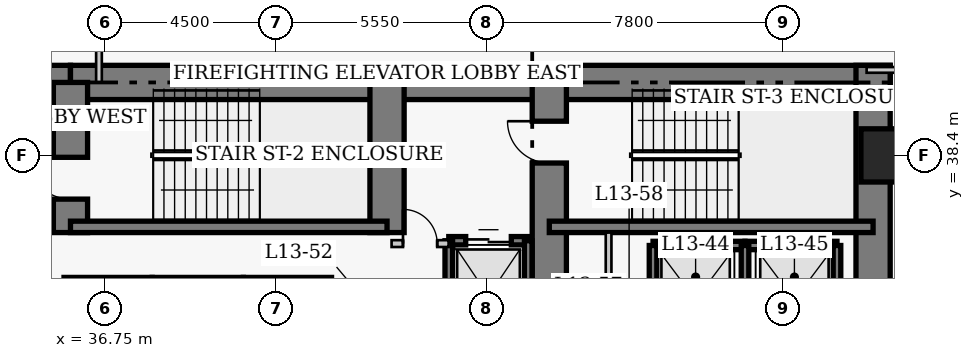
"""IFC4 building model, lengths in metres.
Left out: names, types, materials, properties, quantities, classifications, styles, units other than length and angle.
Written with IfcOpenShell. Run it as: python <this file> out.ifc"""

import sys

from ifc_helpers import new_model, si_unit, direction, frame, frame_2d, origin, origin_2d, place, context, subcontext, project, spatial, rectangle, extrude, element, fill, save


model = new_model("IFC4")
c1 = context("Model", 3, precision=1e-05, world=origin(), true_north=direction((0.0, 1.0)))
c2 = subcontext(c1, "Body", "Model", "MODEL_VIEW")
j1 = project(units=[si_unit("LENGTHUNIT", "METRE"), si_unit("PLANEANGLEUNIT", "RADIAN")], contexts=[c1])
p1 = place(None, origin())
s1 = spatial("IfcSite", under=j1, at=p1, CompositionType="ELEMENT")
p2 = place(p1, origin())
s2 = spatial("IfcBuilding", under=s1, at=p2, CompositionType="ELEMENT")
p3 = place(p2, frame((0.0, 0.0, 56.4)))
s3 = spatial("IfcBuildingStorey", under=s2, at=p3, CompositionType="ELEMENT", Elevation=56.4)
p4 = place(p3, frame((21.45, 40.32, 0.0), z_axis=(0.0, 0.0, 1.0), x_axis=(1.0, 0.0, 0.0)))
e1 = element("IfcWall", 1, at=p4, inside=s3, PredefinedType="SHEAR", context=c2, shape_type="SweptSolid", body=[
    extrude(rectangle(XDim=14.4, YDim=0.9, at=frame_2d((7.2, 0.0))), origin(), (0.0, 0.0, 1.0), 3.8),
])
p5 = place(p3, frame((35.85, 40.32, 0.0), z_axis=(0.0, 0.0, 1.0), x_axis=(1.0, 0.0, 0.0)))
e2 = element("IfcWall", 2, at=p5, inside=s3, PredefinedType="SHEAR", context=c2, shape_type="SweptSolid", body=[
    extrude(rectangle(XDim=12.6, YDim=0.9, at=frame_2d((6.3, 0.0))), origin(), (0.0, 0.0, 1.0), 3.8),
])
p6 = place(p3, frame((48.45, 40.32, 0.0), z_axis=(0.0, 0.0, 1.0), x_axis=(1.0, 0.0, 0.0)))
e3 = element("IfcWall", 3, at=p6, inside=s3, PredefinedType="SHEAR", context=c2, shape_type="SweptSolid", body=[
    extrude(rectangle(XDim=8.97, YDim=0.9, at=frame_2d((4.485, 0.0))), origin(), (0.0, 0.0, 1.0), 3.8),
])
p7 = place(p3, frame((56.97, 27.05, 0.0), z_axis=(0.0, 0.0, 1.0), x_axis=(0.0, 1.0, 0.0)))
e4 = element("IfcWall", 4, at=p7, inside=s3, PredefinedType="SHEAR", context=c2, shape_type="SweptSolid", body=[
    extrude(rectangle(XDim=13.72, YDim=0.9, at=frame_2d((6.86, 0.0))), origin(), (0.0, 0.0, 1.0), 3.8),
])
p8 = place(p3, frame((35.85, 36.37, 0.0), z_axis=(0.0, 0.0, 1.0), x_axis=(0.0, 1.0, 0.0)))
e5 = element("IfcWall", 5, at=p8, inside=s3, PredefinedType="SHEAR", context=c2, shape_type="SweptSolid", body=[
    extrude(rectangle(XDim=3.95, YDim=0.9, at=frame_2d((1.975, 0.0))), origin(), (0.0, 0.0, 1.0), 3.8),
])
p9 = place(p8, frame((0.88, 0.0, 0.0)))
e6 = element("IfcOpeningElement", 6, at=p9, cuts=e5, PredefinedType="OPENING", context=c2, shape_type="SweptSolid", body=[
    extrude(rectangle(XDim=1.1, YDim=2.15, at=frame_2d((0.55, 1.075))), frame((0.0, 0.46, 0.0), z_axis=(0.0, -1.0, 0.0), x_axis=(1.0, 0.0, 0.0)), (0.0, 0.0, 1.0), 0.92),
])
p10 = place(p3, frame((44.18, 36.37, 0.0), z_axis=(0.0, 0.0, 1.0), x_axis=(0.0, 1.0, 0.0)))
e7 = element("IfcWall", 7, at=p10, inside=s3, PredefinedType="SHEAR", context=c2, shape_type="SweptSolid", body=[
    extrude(rectangle(XDim=3.95, YDim=0.9, at=frame_2d((1.975, 0.0))), origin(), (0.0, 0.0, 1.0), 3.8),
])
p11 = place(p3, frame((48.45, 32.3, 0.0), z_axis=(0.0, 0.0, 1.0), x_axis=(0.0, 1.0, 0.0)))
e8 = element("IfcWall", 8, at=p11, inside=s3, PredefinedType="SHEAR", context=c2, shape_type="SweptSolid", body=[
    extrude(rectangle(XDim=8.02, YDim=0.9, at=frame_2d((4.01, 0.0))), origin(), (0.0, 0.0, 1.0), 3.8),
])
p12 = place(p11, frame((5.9, 0.0, 0.0)))
e9 = element("IfcOpeningElement", 9, at=p12, cuts=e8, PredefinedType="OPENING", context=c2, shape_type="SweptSolid", body=[
    extrude(rectangle(XDim=1.1, YDim=2.15, at=frame_2d((0.55, 1.075))), frame((0.0, 0.46, 0.0), z_axis=(0.0, -1.0, 0.0), x_axis=(1.0, 0.0, 0.0)), (0.0, 0.0, 1.0), 0.92),
])
p13 = place(p3, frame((35.85, 36.52, 0.0), z_axis=(0.0, 0.0, 1.0), x_axis=(1.0, 0.0, 0.0)))
e10 = element("IfcWall", 10, at=p13, inside=s3, PredefinedType="SHEAR", context=c2, shape_type="SweptSolid", body=[
    extrude(rectangle(XDim=8.33, YDim=0.3, at=frame_2d((4.165, 0.0))), origin(), (0.0, 0.0, 1.0), 3.8),
])
p14 = place(p3, frame((48.45, 36.52, 0.0), z_axis=(0.0, 0.0, 1.0), x_axis=(1.0, 0.0, 0.0)))
e11 = element("IfcWall", 11, at=p14, inside=s3, PredefinedType="SHEAR", context=c2, shape_type="SweptSolid", body=[
    extrude(rectangle(XDim=8.52, YDim=0.3, at=frame_2d((4.26, 0.0))), origin(), (0.0, 0.0, 1.0), 3.8),
])
p15 = place(p3, frame((57.35, 38.4, 0.0), z_axis=(0.0, 0.0, 1.0), x_axis=(1.0, 0.0, 0.0)))
e12 = element("IfcColumn", 12, at=p15, inside=s3, PredefinedType="COLUMN", context=c2, shape_type="SweptSolid", body=[
    extrude(rectangle(XDim=1.4, YDim=1.4, at=origin_2d()), origin(), (0.0, 0.0, 1.0), 3.8),
])
p16 = place(p3, frame((35.68, 35.08, 0.0), z_axis=(0.0, 0.0, 1.0), x_axis=(1.0, 0.0, 0.0)))
e13 = element("IfcWall", 13, at=p16, inside=s3, PredefinedType="SHEAR", context=c2, shape_type="SweptSolid", body=[
    extrude(rectangle(XDim=2.32, YDim=0.22, at=frame_2d((1.16, 0.0))), origin(), (0.0, 0.0, 1.0), 3.8),
])
p17 = place(p3, frame((38.0, 35.08, 0.0), z_axis=(0.0, 0.0, 1.0), x_axis=(1.0, 0.0, 0.0)))
e14 = element("IfcWall", 14, at=p17, inside=s3, PredefinedType="SHEAR", context=c2, shape_type="SweptSolid", body=[
    extrude(rectangle(XDim=2.4, YDim=0.22, at=frame_2d((1.2, 0.0))), origin(), (0.0, 0.0, 1.0), 3.8),
])
p18 = place(p3, frame((40.4, 35.08, 0.0), z_axis=(0.0, 0.0, 1.0), x_axis=(1.0, 0.0, 0.0)))
e15 = element("IfcWall", 15, at=p18, inside=s3, PredefinedType="SHEAR", context=c2, shape_type="SweptSolid", body=[
    extrude(rectangle(XDim=2.32, YDim=0.22, at=frame_2d((1.16, 0.0))), origin(), (0.0, 0.0, 1.0), 3.8),
])
p19 = place(p3, frame((51.18, 36.03, 0.0), z_axis=(0.0, 0.0, 1.0), x_axis=(1.0, 0.0, 0.0)))
e16 = element("IfcWall", 16, at=p19, inside=s3, PredefinedType="SHEAR", context=c2, shape_type="SweptSolid", body=[
    extrude(rectangle(XDim=2.42, YDim=0.22, at=frame_2d((1.21, 0.0))), origin(), (0.0, 0.0, 1.0), 3.8),
])
p20 = place(p3, frame((51.18, 33.17, 0.0), z_axis=(0.0, 0.0, 1.0), x_axis=(0.0, 1.0, 0.0)))
e17 = element("IfcWall", 17, at=p20, inside=s3, PredefinedType="SHEAR", context=c2, shape_type="SweptSolid", body=[
    extrude(rectangle(XDim=2.86, YDim=0.2, at=frame_2d((1.43, 0.0))), origin(), (0.0, 0.0, 1.0), 3.8),
])
p21 = place(p3, frame((53.6, 36.03, 0.0), z_axis=(0.0, 0.0, 1.0), x_axis=(1.0, 0.0, 0.0)))
e18 = element("IfcWall", 18, at=p21, inside=s3, PredefinedType="SHEAR", context=c2, shape_type="SweptSolid", body=[
    extrude(rectangle(XDim=2.42, YDim=0.22, at=frame_2d((1.21, 0.0))), origin(), (0.0, 0.0, 1.0), 3.8),
])
for number, where, z_axis, x_axis in (
    (19, (53.6, 33.17, 0.0), (0.0, 0.0, 1.0), (0.0, 1.0, 0.0)),
    (20, (56.02, 33.17, 0.0), (0.0, 0.0, 1.0), (0.0, 1.0, 0.0)),
):
    element("IfcWall", number, at=place(p3, frame(where, z_axis=z_axis, x_axis=x_axis)), inside=s3, PredefinedType="SHEAR", context=c2, shape_type="SweptSolid", body=[
        extrude(rectangle(XDim=2.86, YDim=0.2, at=frame_2d((1.43, 0.0))), origin(), (0.0, 0.0, 1.0), 3.8),
    ])
p22 = place(p3, frame((45.805, 36.155, 0.0), z_axis=(0.0, 0.0, 1.0), x_axis=(1.0, 0.0, 0.0)))
e21 = element("IfcWall", 21, at=p22, inside=s3, PredefinedType="SHEAR", context=c2, shape_type="SweptSolid", body=[
    extrude(rectangle(XDim=2.09, YDim=0.22, at=frame_2d((1.045, 0.0))), origin(), (0.0, 0.0, 1.0), 3.8),
])
p23 = place(p22, frame((0.445, 0.0, 0.0)))
e22 = element("IfcOpeningElement", 22, at=p23, cuts=e21, PredefinedType="OPENING", context=c2, shape_type="SweptSolid", body=[
    extrude(rectangle(XDim=1.2, YDim=2.15, at=frame_2d((0.6, 1.075))), frame((0.0, 0.12, 0.0), z_axis=(0.0, -1.0, 0.0), x_axis=(1.0, 0.0, 0.0)), (0.0, 0.0, 1.0), 0.24),
])
p24 = place(p3, frame((45.805, 32.65, 0.0), z_axis=(0.0, 0.0, 1.0), x_axis=(0.0, 1.0, 0.0)))
e23 = element("IfcWall", 23, at=p24, inside=s3, PredefinedType="SHEAR", context=c2, shape_type="SweptSolid", body=[
    extrude(rectangle(XDim=3.505, YDim=0.2, at=frame_2d((1.752, 0.0))), origin(), (0.0, 0.0, 1.0), 3.8),
])
p25 = place(p3, frame((47.895, 33.245, 0.0), z_axis=(0.0, 0.0, 1.0), x_axis=(0.0, 1.0, 0.0)))
e24 = element("IfcWall", 24, at=p25, inside=s3, PredefinedType="SHEAR", context=c2, shape_type="SweptSolid", body=[
    extrude(rectangle(XDim=2.91, YDim=0.2, at=frame_2d((1.455, 0.0))), origin(), (0.0, 0.0, 1.0), 3.8),
])
p26 = place(p3, frame((44.3, 36.08, 0.0), z_axis=(0.0, 0.0, 1.0), x_axis=(1.0, 0.0, 0.0)))
e25 = element("IfcWall", 25, at=p26, inside=s3, PredefinedType="PARTITIONING", context=c2, shape_type="SweptSolid", body=[
    extrude(rectangle(XDim=1.5, YDim=0.18, at=frame_2d((0.75, 0.0))), origin(), (0.0, 0.0, 1.0), 3.54),
])
p27 = place(p26, frame((0.3, 0.0, 0.0)))
e26 = element("IfcOpeningElement", 26, at=p27, cuts=e25, PredefinedType="OPENING", context=c2, shape_type="SweptSolid", body=[
    extrude(rectangle(XDim=0.9, YDim=2.15, at=frame_2d((0.45, 1.075))), frame((0.0, 0.1, 0.0), z_axis=(0.0, -1.0, 0.0), x_axis=(1.0, 0.0, 0.0)), (0.0, 0.0, 1.0), 0.2),
])
p28 = place(p3, frame((50.01, 32.75, 0.0), z_axis=(0.0, 0.0, 1.0), x_axis=(0.0, 1.0, 0.0)))
e27 = element("IfcWall", 27, at=p28, inside=s3, PredefinedType="PARTITIONING", context=c2, shape_type="SweptSolid", body=[
    extrude(rectangle(XDim=3.62, YDim=0.15, at=frame_2d((1.81, 0.0))), origin(), (0.0, 0.0, 1.0), 3.54),
])
p29 = place(p3, frame((56.8, 40.65, 0.0), z_axis=(0.0, 0.0, 1.0), x_axis=(1.0, 0.0, 0.0)))
e28 = element("IfcWall", 28, at=p29, inside=s3, PredefinedType="PARTITIONING", context=c2, shape_type="SweptSolid", body=[
    extrude(rectangle(XDim=4.36, YDim=0.15, at=frame_2d((2.18, 0.0))), origin(), (0.0, 0.0, 1.0), 3.54),
])
p30 = place(p29, frame((2.75, 0.0, 0.0)))
e29 = element("IfcOpeningElement", 29, at=p30, cuts=e28, PredefinedType="OPENING", context=c2, shape_type="SweptSolid", body=[
    extrude(rectangle(XDim=1.0, YDim=2.15, at=frame_2d((0.5, 1.075))), frame((0.0, 0.085, 0.0), z_axis=(0.0, -1.0, 0.0), x_axis=(1.0, 0.0, 0.0)), (0.0, 0.0, 1.0), 0.17),
])
p31 = place(p3, frame((36.6, 40.32, 0.0), z_axis=(0.0, 0.0, 1.0), x_axis=(0.0, 1.0, 0.0)))
e30 = element("IfcWall", 30, at=p31, inside=s3, PredefinedType="PARTITIONING", context=c2, shape_type="SweptSolid", body=[
    extrude(rectangle(XDim=5.045, YDim=0.15, at=frame_2d((2.522, 0.0))), origin(), (0.0, 0.0, 1.0), 3.54),
])
p32 = place(p23, origin())
e31 = element("IfcDoor", 31, at=p32, inside=s3, OperationType="DOUBLE_DOOR_SLIDING", PredefinedType="DOOR", context=c2, shape_type="SweptSolid", body=[
    extrude(rectangle(XDim=1.2, YDim=2.15, at=frame_2d((0.6, 1.075))), frame((0.0, 0.025, 0.0), z_axis=(0.0, -1.0, 0.0), x_axis=(1.0, 0.0, 0.0)), (0.0, 0.0, 1.0), 0.05),
])
fill(e22, e31)
p33 = place(p27, origin())
e32 = element("IfcDoor", 32, at=p33, inside=s3, OperationType="SINGLE_SWING_LEFT", PredefinedType="DOOR", context=c2, shape_type="SweptSolid", body=[
    extrude(rectangle(XDim=0.9, YDim=2.15, at=frame_2d((0.45, 1.075))), frame((0.0, 0.025, 0.0), z_axis=(0.0, -1.0, 0.0), x_axis=(1.0, 0.0, 0.0)), (0.0, 0.0, 1.0), 0.05),
])
fill(e26, e32)
p34 = place(p9, origin())
e33 = element("IfcDoor", 33, at=p34, inside=s3, OperationType="SINGLE_SWING_RIGHT", PredefinedType="DOOR", context=c2, shape_type="SweptSolid", body=[
    extrude(rectangle(XDim=1.1, YDim=2.15, at=frame_2d((0.55, 1.075))), frame((0.0, 0.025, 0.0), z_axis=(0.0, -1.0, 0.0), x_axis=(1.0, 0.0, 0.0)), (0.0, 0.0, 1.0), 0.05),
])
fill(e6, e33)
p35 = place(p12, origin())
e34 = element("IfcDoor", 34, at=p35, inside=s3, OperationType="SINGLE_SWING_RIGHT", PredefinedType="DOOR", context=c2, shape_type="SweptSolid", body=[
    extrude(rectangle(XDim=1.1, YDim=2.15, at=frame_2d((0.55, 1.075))), frame((0.0, 0.025, 0.0), z_axis=(0.0, -1.0, 0.0), x_axis=(1.0, 0.0, 0.0)), (0.0, 0.0, 1.0), 0.05),
])
fill(e9, e34)
save(model, sys.argv[1])
